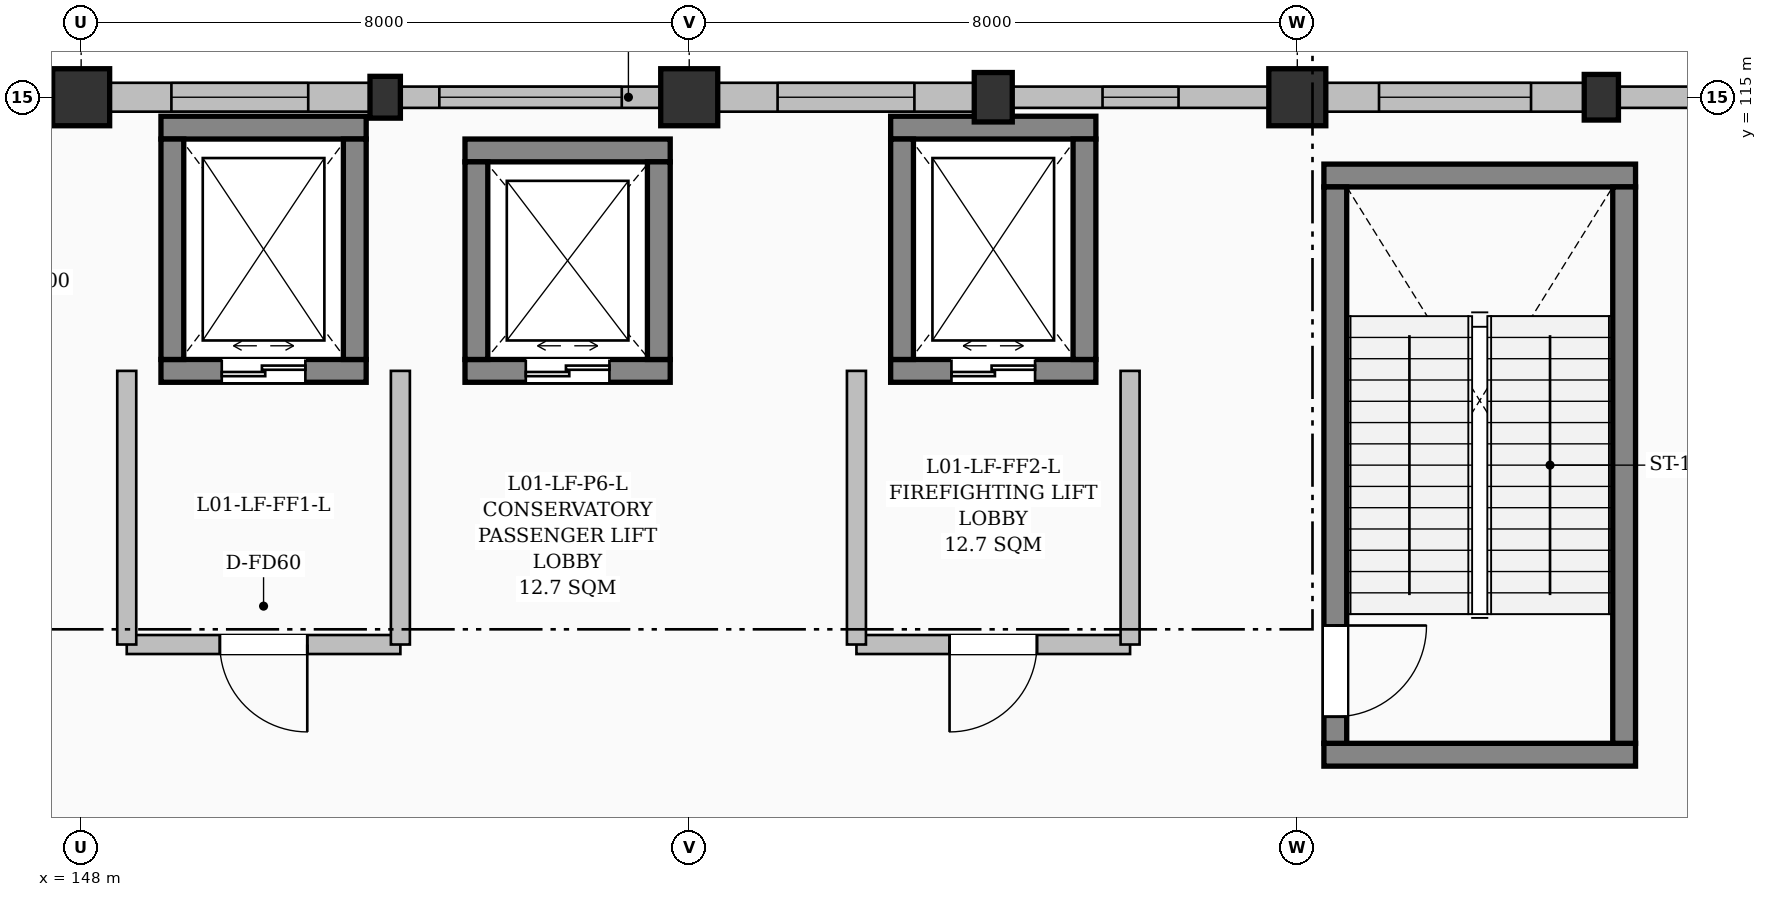
"""IFC4 building model, lengths in metres.
Left out: names, types, materials, properties, quantities, classifications, styles, units other than length and angle.
Written with IfcOpenShell. Run it as: python <this file> out.ifc"""

import sys

from ifc_helpers import new_model, si_unit, direction, frame, frame_2d, origin, origin_2d, place, context, subcontext, project, spatial, rectangle, extrude, element, fill, save


model = new_model("IFC4")
c1 = context("Model", 3, precision=1e-05, world=origin(), true_north=direction((0.0, 1.0)))
c2 = subcontext(c1, "Body", "Model", "MODEL_VIEW")
j1 = project(units=[si_unit("LENGTHUNIT", "METRE"), si_unit("PLANEANGLEUNIT", "RADIAN")], contexts=[c1])
p1 = place(None, origin())
s1 = spatial("IfcSite", under=j1, at=p1, CompositionType="ELEMENT")
p2 = place(p1, origin())
s2 = spatial("IfcBuilding", under=s1, at=p2, CompositionType="ELEMENT")
p3 = place(p2, frame((0.0, 0.0, 4.8)))
s3 = spatial("IfcBuildingStorey", under=s2, at=p3, CompositionType="ELEMENT", Elevation=4.8)
p4 = place(p3, frame((148.0, 115.0, 0.0), z_axis=(0.0, 0.0, 1.0), x_axis=(1.0, 0.0, 0.0)))
e1 = element("IfcColumn", 1, at=p4, inside=s3, PredefinedType="COLUMN", context=c2, shape_type="SweptSolid", body=[
    extrude(rectangle(XDim=0.75, YDim=0.75, at=origin_2d()), origin(), (0.0, 0.0, 1.0), 4.5),
])
p5 = place(p3, frame((152.0, 115.0, 0.0), z_axis=(0.0, 0.0, 1.0), x_axis=(1.0, 0.0, 0.0)))
e2 = element("IfcColumn", 2, at=p5, inside=s3, PredefinedType="PILASTER", context=c2, shape_type="SweptSolid", body=[
    extrude(rectangle(XDim=0.4, YDim=0.55, at=origin_2d()), origin(), (0.0, 0.0, 1.0), 4.5),
])
p6 = place(p3, frame((156.0, 115.0, 0.0), z_axis=(0.0, 0.0, 1.0), x_axis=(1.0, 0.0, 0.0)))
e3 = element("IfcColumn", 3, at=p6, inside=s3, PredefinedType="COLUMN", context=c2, shape_type="SweptSolid", body=[
    extrude(rectangle(XDim=0.75, YDim=0.75, at=origin_2d()), origin(), (0.0, 0.0, 1.0), 4.5),
])
p7 = place(p3, frame((160.0, 115.0, 0.0), z_axis=(0.0, 0.0, 1.0), x_axis=(1.0, 0.0, 0.0)))
e4 = element("IfcColumn", 4, at=p7, inside=s3, PredefinedType="PILASTER", context=c2, shape_type="SweptSolid", body=[
    extrude(rectangle(XDim=0.5, YDim=0.65, at=origin_2d()), origin(), (0.0, 0.0, 1.0), 4.5),
])
p8 = place(p3, frame((164.0, 115.0, 0.0), z_axis=(0.0, 0.0, 1.0), x_axis=(1.0, 0.0, 0.0)))
e5 = element("IfcColumn", 5, at=p8, inside=s3, PredefinedType="COLUMN", context=c2, shape_type="SweptSolid", body=[
    extrude(rectangle(XDim=0.75, YDim=0.75, at=origin_2d()), origin(), (0.0, 0.0, 1.0), 4.5),
])
p9 = place(p3, frame((168.0, 115.0, 0.0), z_axis=(0.0, 0.0, 1.0), x_axis=(1.0, 0.0, 0.0)))
e6 = element("IfcColumn", 6, at=p9, inside=s3, PredefinedType="PILASTER", context=c2, shape_type="SweptSolid", body=[
    extrude(rectangle(XDim=0.45, YDim=0.6, at=origin_2d()), origin(), (0.0, 0.0, 1.0), 4.5),
])
p10 = place(p3, frame((144.225, 115.0, 0.0), z_axis=(0.0, 0.0, 1.0), x_axis=(1.0, 0.0, 0.0)))
e7 = element("IfcWall", 7, at=p10, inside=s3, PredefinedType="SOLIDWALL", context=c2, shape_type="SweptSolid", body=[
    extrude(rectangle(XDim=3.4, YDim=0.28, at=frame_2d((1.7, 0.0))), origin(), (0.0, 0.0, 1.0), 3.935),
])
p11 = place(p10, frame((1.1, 0.0, 0.95)))
e8 = element("IfcOpeningElement", 8, at=p11, cuts=e7, PredefinedType="OPENING", context=c2, shape_type="SweptSolid", body=[
    extrude(rectangle(XDim=1.2, YDim=1.8, at=frame_2d((0.6, 0.9))), frame((0.0, 0.15, 0.0), z_axis=(0.0, -1.0, 0.0), x_axis=(1.0, 0.0, 0.0)), (0.0, 0.0, 1.0), 0.3),
])
p12 = place(p3, frame((148.375, 115.0, 0.0), z_axis=(0.0, 0.0, 1.0), x_axis=(1.0, 0.0, 0.0)))
e9 = element("IfcWall", 9, at=p12, inside=s3, PredefinedType="SOLIDWALL", context=c2, shape_type="SweptSolid", body=[
    extrude(rectangle(XDim=3.425, YDim=0.38, at=frame_2d((1.712, 0.0))), origin(), (0.0, 0.0, 1.0), 3.735),
])
p13 = place(p12, frame((0.812, 0.0, 0.95)))
e10 = element("IfcOpeningElement", 10, at=p13, cuts=e9, PredefinedType="OPENING", context=c2, shape_type="SweptSolid", body=[
    extrude(rectangle(XDim=1.8, YDim=1.8, at=frame_2d((0.9, 0.9))), frame((0.0, 0.2, 0.0), z_axis=(0.0, -1.0, 0.0), x_axis=(1.0, 0.0, 0.0)), (0.0, 0.0, 1.0), 0.4),
])
p14 = place(p3, frame((152.2, 115.0, 0.0), z_axis=(0.0, 0.0, 1.0), x_axis=(1.0, 0.0, 0.0)))
e11 = element("IfcWall", 11, at=p14, inside=s3, PredefinedType="SOLIDWALL", context=c2, shape_type="SweptSolid", body=[
    extrude(rectangle(XDim=3.425, YDim=0.28, at=frame_2d((1.712, 0.0))), origin(), (0.0, 0.0, 1.0), 3.735),
])
p15 = place(p14, frame((0.512, 0.0, 0.95)))
e12 = element("IfcOpeningElement", 12, at=p15, cuts=e11, PredefinedType="OPENING", context=c2, shape_type="SweptSolid", body=[
    extrude(rectangle(XDim=2.4, YDim=1.8, at=frame_2d((1.2, 0.9))), frame((0.0, 0.15, 0.0), z_axis=(0.0, -1.0, 0.0), x_axis=(1.0, 0.0, 0.0)), (0.0, 0.0, 1.0), 0.3),
])
p16 = place(p3, frame((156.375, 115.0, 0.0), z_axis=(0.0, 0.0, 1.0), x_axis=(1.0, 0.0, 0.0)))
e13 = element("IfcWall", 13, at=p16, inside=s3, PredefinedType="SOLIDWALL", context=c2, shape_type="SweptSolid", body=[
    extrude(rectangle(XDim=3.375, YDim=0.38, at=frame_2d((1.688, 0.0))), origin(), (0.0, 0.0, 1.0), 3.685),
])
p17 = place(p16, frame((0.788, 0.0, 0.95)))
e14 = element("IfcOpeningElement", 14, at=p17, cuts=e13, PredefinedType="OPENING", context=c2, shape_type="SweptSolid", body=[
    extrude(rectangle(XDim=1.8, YDim=1.5, at=frame_2d((0.9, 0.75))), frame((0.0, 0.2, 0.0), z_axis=(0.0, -1.0, 0.0), x_axis=(1.0, 0.0, 0.0)), (0.0, 0.0, 1.0), 0.4),
])
p18 = place(p3, frame((160.25, 115.0, 0.0), z_axis=(0.0, 0.0, 1.0), x_axis=(1.0, 0.0, 0.0)))
e15 = element("IfcWall", 15, at=p18, inside=s3, PredefinedType="SOLIDWALL", context=c2, shape_type="SweptSolid", body=[
    extrude(rectangle(XDim=3.375, YDim=0.28, at=frame_2d((1.688, 0.0))), origin(), (0.0, 0.0, 1.0), 3.685),
])
p19 = place(p18, frame((1.188, 0.0, 0.95)))
e16 = element("IfcOpeningElement", 16, at=p19, cuts=e15, PredefinedType="OPENING", context=c2, shape_type="SweptSolid", body=[
    extrude(rectangle(XDim=1.0, YDim=1.4, at=frame_2d((0.5, 0.7))), frame((0.0, 0.15, 0.0), z_axis=(0.0, -1.0, 0.0), x_axis=(1.0, 0.0, 0.0)), (0.0, 0.0, 1.0), 0.3),
])
p20 = place(p3, frame((164.375, 115.0, 0.0), z_axis=(0.0, 0.0, 1.0), x_axis=(1.0, 0.0, 0.0)))
e17 = element("IfcWall", 17, at=p20, inside=s3, PredefinedType="SOLIDWALL", context=c2, shape_type="SweptSolid", body=[
    extrude(rectangle(XDim=3.4, YDim=0.38, at=frame_2d((1.7, 0.0))), origin(), (0.0, 0.0, 1.0), 3.635),
])
p21 = place(p20, frame((0.7, 0.0, 0.95)))
e18 = element("IfcOpeningElement", 18, at=p21, cuts=e17, PredefinedType="OPENING", context=c2, shape_type="SweptSolid", body=[
    extrude(rectangle(XDim=2.0, YDim=1.2, at=frame_2d((1.0, 0.6))), frame((0.0, 0.2, 0.0), z_axis=(0.0, -1.0, 0.0), x_axis=(1.0, 0.0, 0.0)), (0.0, 0.0, 1.0), 0.4),
])
p22 = place(p3, frame((168.225, 115.0, 0.0), z_axis=(0.0, 0.0, 1.0), x_axis=(1.0, 0.0, 0.0)))
e19 = element("IfcWall", 19, at=p22, inside=s3, PredefinedType="SOLIDWALL", context=c2, shape_type="SweptSolid", body=[
    extrude(rectangle(XDim=3.4, YDim=0.28, at=frame_2d((1.7, 0.0))), origin(), (0.0, 0.0, 1.0), 3.635),
])
p23 = place(p22, frame((1.15, 0.0, 0.95)))
e20 = element("IfcOpeningElement", 20, at=p23, cuts=e19, PredefinedType="OPENING", context=c2, shape_type="SweptSolid", body=[
    extrude(rectangle(XDim=1.1, YDim=2.0, at=frame_2d((0.55, 1.0))), frame((0.0, 0.15, 0.0), z_axis=(0.0, -1.0, 0.0), x_axis=(1.0, 0.0, 0.0)), (0.0, 0.0, 1.0), 0.3),
])
for number, where, z_axis, x_axis in (
    (21, (164.35, 106.35, 0.0), (0.0, 0.0, 1.0), (1.0, 0.0, 0.0)),
    (22, (168.45, 113.97, 0.0), (0.0, 0.0, 1.0), (-1.0, 0.0, 0.0)),
):
    element("IfcWall", number, at=place(p3, frame(where, z_axis=z_axis, x_axis=x_axis)), inside=s3, PredefinedType="SHEAR", context=c2, shape_type="SweptSolid", body=[
        extrude(rectangle(XDim=4.1, YDim=0.3, at=frame_2d((2.05, 0.0))), origin(), (0.0, 0.0, 1.0), 4.25),
    ])
p24 = place(p3, frame((164.5, 113.82, 0.0), z_axis=(0.0, 0.0, 1.0), x_axis=(0.0, -1.0, 0.0)))
e23 = element("IfcWall", 23, at=p24, inside=s3, PredefinedType="SHEAR", context=c2, shape_type="SweptSolid", body=[
    extrude(rectangle(XDim=7.32, YDim=0.3, at=frame_2d((3.66, 0.0))), origin(), (0.0, 0.0, 1.0), 4.25),
])
p25 = place(p24, frame((5.77, 0.0, 0.0)))
e24 = element("IfcOpeningElement", 24, at=p25, cuts=e23, PredefinedType="OPENING", context=c2, shape_type="SweptSolid", body=[
    extrude(rectangle(XDim=1.2, YDim=2.15, at=frame_2d((0.6, 1.075))), frame((0.0, 0.16, 0.0), z_axis=(0.0, -1.0, 0.0), x_axis=(1.0, 0.0, 0.0)), (0.0, 0.0, 1.0), 0.32),
])
p26 = place(p3, frame((168.3, 113.82, 0.0), z_axis=(0.0, 0.0, 1.0), x_axis=(0.0, -1.0, 0.0)))
e25 = element("IfcWall", 25, at=p26, inside=s3, PredefinedType="SHEAR", context=c2, shape_type="SweptSolid", body=[
    extrude(rectangle(XDim=7.32, YDim=0.3, at=frame_2d((3.66, 0.0))), origin(), (0.0, 0.0, 1.0), 4.25),
])
p27 = place(p3, frame((149.05, 111.4, 0.0), z_axis=(0.0, 0.0, 1.0), x_axis=(1.0, 0.0, 0.0)))
e26 = element("IfcWall", 26, at=p27, inside=s3, PredefinedType="SHEAR", context=c2, shape_type="SweptSolid", body=[
    extrude(rectangle(XDim=2.7, YDim=0.3, at=frame_2d((1.35, 0.0))), origin(), (0.0, 0.0, 1.0), 4.25),
])
p28 = place(p27, frame((0.8, 0.0, 0.0)))
e27 = element("IfcOpeningElement", 27, at=p28, cuts=e26, PredefinedType="OPENING", context=c2, shape_type="SweptSolid", body=[
    extrude(rectangle(XDim=1.1, YDim=2.15, at=frame_2d((0.55, 1.075))), frame((0.0, 0.16, 0.0), z_axis=(0.0, -1.0, 0.0), x_axis=(1.0, 0.0, 0.0)), (0.0, 0.0, 1.0), 0.32),
])
p29 = place(p3, frame((151.75, 114.6, 0.0), z_axis=(0.0, 0.0, 1.0), x_axis=(-1.0, 0.0, 0.0)))
e28 = element("IfcWall", 28, at=p29, inside=s3, PredefinedType="SHEAR", context=c2, shape_type="SweptSolid", body=[
    extrude(rectangle(XDim=2.7, YDim=0.3, at=frame_2d((1.35, 0.0))), origin(), (0.0, 0.0, 1.0), 4.25),
])
for number, where, z_axis, x_axis in (
    (29, (149.2, 111.55, 0.0), (0.0, 0.0, 1.0), (0.0, 1.0, 0.0)),
    (30, (151.6, 114.45, 0.0), (0.0, 0.0, 1.0), (0.0, -1.0, 0.0)),
):
    element("IfcWall", number, at=place(p3, frame(where, z_axis=z_axis, x_axis=x_axis)), inside=s3, PredefinedType="SHEAR", context=c2, shape_type="SweptSolid", body=[
        extrude(rectangle(XDim=2.9, YDim=0.3, at=frame_2d((1.45, 0.0))), origin(), (0.0, 0.0, 1.0), 4.25),
    ])
p30 = place(p3, frame((152.2, 107.8, 0.0), z_axis=(0.0, 0.0, 1.0), x_axis=(-1.0, 0.0, 0.0)))
e31 = element("IfcWall", 31, at=p30, inside=s3, PredefinedType="SOLIDWALL", context=c2, shape_type="SweptSolid", body=[
    extrude(rectangle(XDim=3.6, YDim=0.25, at=frame_2d((1.8, 0.0))), origin(), (0.0, 0.0, 1.0), 4.25),
])
p31 = place(p30, frame((1.225, 0.0, 0.0)))
e32 = element("IfcOpeningElement", 32, at=p31, cuts=e31, PredefinedType="OPENING", context=c2, shape_type="SweptSolid", body=[
    extrude(rectangle(XDim=1.15, YDim=2.15, at=frame_2d((0.575, 1.075))), frame((0.0, 0.135, 0.0), z_axis=(0.0, -1.0, 0.0), x_axis=(1.0, 0.0, 0.0)), (0.0, 0.0, 1.0), 0.27),
])
for number, where, z_axis, x_axis in (
    (33, (148.6, 107.8, 0.0), (0.0, 0.0, 1.0), (0.0, 1.0, 0.0)),
    (34, (152.2, 111.4, 0.0), (0.0, 0.0, 1.0), (0.0, -1.0, 0.0)),
):
    element("IfcWall", number, at=place(p3, frame(where, z_axis=z_axis, x_axis=x_axis)), inside=s3, PredefinedType="SOLIDWALL", context=c2, shape_type="SweptSolid", body=[
        extrude(rectangle(XDim=3.6, YDim=0.25, at=frame_2d((1.8, 0.0))), origin(), (0.0, 0.0, 1.0), 4.25),
    ])
p32 = place(p3, frame((158.65, 111.4, 0.0), z_axis=(0.0, 0.0, 1.0), x_axis=(1.0, 0.0, 0.0)))
e35 = element("IfcWall", 35, at=p32, inside=s3, PredefinedType="SHEAR", context=c2, shape_type="SweptSolid", body=[
    extrude(rectangle(XDim=2.7, YDim=0.3, at=frame_2d((1.35, 0.0))), origin(), (0.0, 0.0, 1.0), 4.25),
])
p33 = place(p32, frame((0.8, 0.0, 0.0)))
e36 = element("IfcOpeningElement", 36, at=p33, cuts=e35, PredefinedType="OPENING", context=c2, shape_type="SweptSolid", body=[
    extrude(rectangle(XDim=1.1, YDim=2.15, at=frame_2d((0.55, 1.075))), frame((0.0, 0.16, 0.0), z_axis=(0.0, -1.0, 0.0), x_axis=(1.0, 0.0, 0.0)), (0.0, 0.0, 1.0), 0.32),
])
p34 = place(p3, frame((161.35, 114.6, 0.0), z_axis=(0.0, 0.0, 1.0), x_axis=(-1.0, 0.0, 0.0)))
e37 = element("IfcWall", 37, at=p34, inside=s3, PredefinedType="SHEAR", context=c2, shape_type="SweptSolid", body=[
    extrude(rectangle(XDim=2.7, YDim=0.3, at=frame_2d((1.35, 0.0))), origin(), (0.0, 0.0, 1.0), 4.25),
])
for number, where, z_axis, x_axis in (
    (38, (158.8, 111.55, 0.0), (0.0, 0.0, 1.0), (0.0, 1.0, 0.0)),
    (39, (161.2, 114.45, 0.0), (0.0, 0.0, 1.0), (0.0, -1.0, 0.0)),
):
    element("IfcWall", number, at=place(p3, frame(where, z_axis=z_axis, x_axis=x_axis)), inside=s3, PredefinedType="SHEAR", context=c2, shape_type="SweptSolid", body=[
        extrude(rectangle(XDim=2.9, YDim=0.3, at=frame_2d((1.45, 0.0))), origin(), (0.0, 0.0, 1.0), 4.25),
    ])
p35 = place(p3, frame((161.8, 107.8, 0.0), z_axis=(0.0, 0.0, 1.0), x_axis=(-1.0, 0.0, 0.0)))
e40 = element("IfcWall", 40, at=p35, inside=s3, PredefinedType="SOLIDWALL", context=c2, shape_type="SweptSolid", body=[
    extrude(rectangle(XDim=3.6, YDim=0.25, at=frame_2d((1.8, 0.0))), origin(), (0.0, 0.0, 1.0), 4.25),
])
p36 = place(p35, frame((1.225, 0.0, 0.0)))
e41 = element("IfcOpeningElement", 41, at=p36, cuts=e40, PredefinedType="OPENING", context=c2, shape_type="SweptSolid", body=[
    extrude(rectangle(XDim=1.15, YDim=2.15, at=frame_2d((0.575, 1.075))), frame((0.0, 0.135, 0.0), z_axis=(0.0, -1.0, 0.0), x_axis=(1.0, 0.0, 0.0)), (0.0, 0.0, 1.0), 0.27),
])
for number, where, z_axis, x_axis in (
    (42, (158.2, 107.8, 0.0), (0.0, 0.0, 1.0), (0.0, 1.0, 0.0)),
    (43, (161.8, 111.4, 0.0), (0.0, 0.0, 1.0), (0.0, -1.0, 0.0)),
):
    element("IfcWall", number, at=place(p3, frame(where, z_axis=z_axis, x_axis=x_axis)), inside=s3, PredefinedType="SOLIDWALL", context=c2, shape_type="SweptSolid", body=[
        extrude(rectangle(XDim=3.6, YDim=0.25, at=frame_2d((1.8, 0.0))), origin(), (0.0, 0.0, 1.0), 4.25),
    ])
p37 = place(p3, frame((153.05, 111.4, 0.0), z_axis=(0.0, 0.0, 1.0), x_axis=(1.0, 0.0, 0.0)))
e44 = element("IfcWall", 44, at=p37, inside=s3, PredefinedType="SHEAR", context=c2, shape_type="SweptSolid", body=[
    extrude(rectangle(XDim=2.7, YDim=0.3, at=frame_2d((1.35, 0.0))), origin(), (0.0, 0.0, 1.0), 4.25),
])
p38 = place(p37, frame((0.8, 0.0, 0.0)))
e45 = element("IfcOpeningElement", 45, at=p38, cuts=e44, PredefinedType="OPENING", context=c2, shape_type="SweptSolid", body=[
    extrude(rectangle(XDim=1.1, YDim=2.15, at=frame_2d((0.55, 1.075))), frame((0.0, 0.16, 0.0), z_axis=(0.0, -1.0, 0.0), x_axis=(1.0, 0.0, 0.0)), (0.0, 0.0, 1.0), 0.32),
])
p39 = place(p3, frame((155.75, 114.3, 0.0), z_axis=(0.0, 0.0, 1.0), x_axis=(-1.0, 0.0, 0.0)))
e46 = element("IfcWall", 46, at=p39, inside=s3, PredefinedType="SHEAR", context=c2, shape_type="SweptSolid", body=[
    extrude(rectangle(XDim=2.7, YDim=0.3, at=frame_2d((1.35, 0.0))), origin(), (0.0, 0.0, 1.0), 4.25),
])
for number, where, z_axis, x_axis in (
    (47, (153.2, 111.55, 0.0), (0.0, 0.0, 1.0), (0.0, 1.0, 0.0)),
    (48, (155.6, 114.15, 0.0), (0.0, 0.0, 1.0), (0.0, -1.0, 0.0)),
):
    element("IfcWall", number, at=place(p3, frame(where, z_axis=z_axis, x_axis=x_axis)), inside=s3, PredefinedType="SHEAR", context=c2, shape_type="SweptSolid", body=[
        extrude(rectangle(XDim=2.6, YDim=0.3, at=frame_2d((1.3, 0.0))), origin(), (0.0, 0.0, 1.0), 4.25),
    ])
p40 = place(p13, origin())
e49 = element("IfcWindow", 49, at=p40, inside=s3, PartitioningType="DOUBLE_PANEL_VERTICAL", PredefinedType="WINDOW", context=c2, shape_type="SweptSolid", body=[
    extrude(rectangle(XDim=1.8, YDim=1.8, at=frame_2d((0.9, 0.9))), frame((0.0, 0.03, 0.0), z_axis=(0.0, -1.0, 0.0), x_axis=(1.0, 0.0, 0.0)), (0.0, 0.0, 1.0), 0.06),
])
fill(e10, e49)
p41 = place(p15, origin())
e50 = element("IfcWindow", 50, at=p41, inside=s3, PartitioningType="TRIPLE_PANEL_VERTICAL", PredefinedType="WINDOW", context=c2, shape_type="SweptSolid", body=[
    extrude(rectangle(XDim=2.4, YDim=1.8, at=frame_2d((1.2, 0.9))), frame((0.0, 0.03, 0.0), z_axis=(0.0, -1.0, 0.0), x_axis=(1.0, 0.0, 0.0)), (0.0, 0.0, 1.0), 0.06),
])
fill(e12, e50)
p42 = place(p17, origin())
e51 = element("IfcWindow", 51, at=p42, inside=s3, PartitioningType="DOUBLE_PANEL_VERTICAL", PredefinedType="WINDOW", context=c2, shape_type="SweptSolid", body=[
    extrude(rectangle(XDim=1.8, YDim=1.5, at=frame_2d((0.9, 0.75))), frame((0.0, 0.03, 0.0), z_axis=(0.0, -1.0, 0.0), x_axis=(1.0, 0.0, 0.0)), (0.0, 0.0, 1.0), 0.06),
])
fill(e14, e51)
p43 = place(p19, origin())
e52 = element("IfcWindow", 52, at=p43, inside=s3, PartitioningType="SINGLE_PANEL", PredefinedType="WINDOW", context=c2, shape_type="SweptSolid", body=[
    extrude(rectangle(XDim=1.0, YDim=1.4, at=frame_2d((0.5, 0.7))), frame((0.0, 0.03, 0.0), z_axis=(0.0, -1.0, 0.0), x_axis=(1.0, 0.0, 0.0)), (0.0, 0.0, 1.0), 0.06),
])
fill(e16, e52)
p44 = place(p21, origin())
e53 = element("IfcWindow", 53, at=p44, inside=s3, PartitioningType="DOUBLE_PANEL_HORIZONTAL", PredefinedType="WINDOW", context=c2, shape_type="SweptSolid", body=[
    extrude(rectangle(XDim=2.0, YDim=1.2, at=frame_2d((1.0, 0.6))), frame((0.0, 0.03, 0.0), z_axis=(0.0, -1.0, 0.0), x_axis=(1.0, 0.0, 0.0)), (0.0, 0.0, 1.0), 0.06),
])
fill(e18, e53)
p45 = place(p25, origin())
e54 = element("IfcDoor", 54, at=p45, inside=s3, OperationType="SINGLE_SWING_LEFT", PredefinedType="DOOR", context=c2, shape_type="SweptSolid", body=[
    extrude(rectangle(XDim=1.2, YDim=2.15, at=frame_2d((0.6, 1.075))), frame((0.0, 0.025, 0.0), z_axis=(0.0, -1.0, 0.0), x_axis=(1.0, 0.0, 0.0)), (0.0, 0.0, 1.0), 0.05),
])
fill(e24, e54)
p46 = place(p28, origin())
e55 = element("IfcDoor", 55, at=p46, inside=s3, OperationType="DOUBLE_DOOR_SLIDING", PredefinedType="DOOR", context=c2, shape_type="SweptSolid", body=[
    extrude(rectangle(XDim=1.1, YDim=2.15, at=frame_2d((0.55, 1.075))), frame((0.0, 0.025, 0.0), z_axis=(0.0, -1.0, 0.0), x_axis=(1.0, 0.0, 0.0)), (0.0, 0.0, 1.0), 0.05),
])
fill(e27, e55)
p47 = place(p31, origin())
e56 = element("IfcDoor", 56, at=p47, inside=s3, OperationType="SINGLE_SWING_LEFT", PredefinedType="DOOR", context=c2, shape_type="SweptSolid", body=[
    extrude(rectangle(XDim=1.15, YDim=2.15, at=frame_2d((0.575, 1.075))), frame((0.0, 0.025, 0.0), z_axis=(0.0, -1.0, 0.0), x_axis=(1.0, 0.0, 0.0)), (0.0, 0.0, 1.0), 0.05),
])
fill(e32, e56)
p48 = place(p33, origin())
e57 = element("IfcDoor", 57, at=p48, inside=s3, OperationType="DOUBLE_DOOR_SLIDING", PredefinedType="DOOR", context=c2, shape_type="SweptSolid", body=[
    extrude(rectangle(XDim=1.1, YDim=2.15, at=frame_2d((0.55, 1.075))), frame((0.0, 0.025, 0.0), z_axis=(0.0, -1.0, 0.0), x_axis=(1.0, 0.0, 0.0)), (0.0, 0.0, 1.0), 0.05),
])
fill(e36, e57)
p49 = place(p36, origin())
e58 = element("IfcDoor", 58, at=p49, inside=s3, OperationType="SINGLE_SWING_RIGHT", PredefinedType="DOOR", context=c2, shape_type="SweptSolid", body=[
    extrude(rectangle(XDim=1.15, YDim=2.15, at=frame_2d((0.575, 1.075))), frame((0.0, 0.025, 0.0), z_axis=(0.0, -1.0, 0.0), x_axis=(1.0, 0.0, 0.0)), (0.0, 0.0, 1.0), 0.05),
])
fill(e41, e58)
p50 = place(p38, origin())
e59 = element("IfcDoor", 59, at=p50, inside=s3, OperationType="DOUBLE_DOOR_SLIDING", PredefinedType="DOOR", context=c2, shape_type="SweptSolid", body=[
    extrude(rectangle(XDim=1.1, YDim=2.15, at=frame_2d((0.55, 1.075))), frame((0.0, 0.025, 0.0), z_axis=(0.0, -1.0, 0.0), x_axis=(1.0, 0.0, 0.0)), (0.0, 0.0, 1.0), 0.05),
])
fill(e45, e59)
save(model, sys.argv[1])
